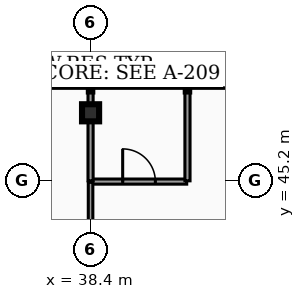
"""IFC4 building model, lengths in metres.
Left out: names, types, materials, properties, quantities, classifications, styles, units other than length and angle.
Written with IfcOpenShell. Run it as: python <this file> out.ifc"""

import sys

from ifc_helpers import new_model, si_unit, direction, frame, frame_2d, origin, origin_2d, place, context, subcontext, project, spatial, rectangle, hollow_rectangle, extrude, element, fill, save


model = new_model("IFC4")
c1 = context("Model", 3, precision=1e-05, world=origin(), true_north=direction((0.0, 1.0)))
c2 = subcontext(c1, "Body", "Model", "MODEL_VIEW")
j1 = project(units=[si_unit("LENGTHUNIT", "METRE"), si_unit("PLANEANGLEUNIT", "RADIAN")], contexts=[c1])
p1 = place(None, origin())
s1 = spatial("IfcSite", under=j1, at=p1, CompositionType="ELEMENT")
p2 = place(p1, origin())
s2 = spatial("IfcBuilding", under=s1, at=p2, CompositionType="ELEMENT")
p3 = place(p2, frame((0.0, 0.0, 282.2)))
s3 = spatial("IfcBuildingStorey", under=s2, at=p3, CompositionType="ELEMENT", Elevation=282.2)
p4 = place(p3, frame((38.4, 46.983, 0.0), z_axis=(0.0, 0.0, 1.0), x_axis=(1.0, 0.0, 0.0)))
e1 = element("IfcColumn", 1, at=p4, inside=s3, PredefinedType="COLUMN", context=c2, shape_type="SweptSolid", body=[
    extrude(hollow_rectangle(XDim=0.45, YDim=0.45, WallThickness=0.022, at=origin_2d()), origin(), (0.0, 0.0, 1.0), 3.18),
])
p5 = place(p3, frame((38.42, 45.173, 0.0), z_axis=(0.0, 0.0, 1.0), x_axis=(1.0, 0.0, 0.0)))
e2 = element("IfcWall", 2, at=p5, inside=s3, PredefinedType="PARTITIONING", context=c2, shape_type="SweptSolid", body=[
    extrude(rectangle(XDim=2.51, YDim=0.135, at=frame_2d((1.255, 0.0))), origin(), (0.0, 0.0, 1.0), 2.235),
])
p6 = place(p5, frame((0.825, 0.0, 0.0)))
e3 = element("IfcOpeningElement", 3, at=p6, cuts=e2, PredefinedType="OPENING", context=c2, shape_type="SweptSolid", body=[
    extrude(rectangle(XDim=0.86, YDim=2.05, at=frame_2d((0.43, 1.025))), frame((0.0, 0.077, 0.0), z_axis=(0.0, -1.0, 0.0), x_axis=(1.0, 0.0, 0.0)), (0.0, 0.0, 1.0), 0.155),
])
p7 = place(p3, frame((40.95, 45.193, 0.0), z_axis=(0.0, 0.0, 1.0), x_axis=(0.0, 1.0, 0.0)))
e4 = element("IfcWall", 4, at=p7, inside=s3, PredefinedType="PARTITIONING", context=c2, shape_type="SweptSolid", body=[
    extrude(rectangle(XDim=2.425, YDim=0.135, at=frame_2d((1.212, 0.0))), origin(), (0.0, 0.0, 1.0), 2.235),
])
p8 = place(p3, frame((38.4, 43.415, 0.0), z_axis=(0.0, 0.0, 1.0), x_axis=(0.0, 1.0, 0.0)))
e5 = element("IfcWall", 5, at=p8, inside=s3, PredefinedType="PARTITIONING", context=c2, shape_type="SweptSolid", body=[
    extrude(rectangle(XDim=1.738, YDim=0.12, at=frame_2d((0.869, 0.0))), origin(), (0.0, 0.0, 1.0), 2.235),
])
p9 = place(p3, frame((38.4, 45.193, 0.0), z_axis=(0.0, 0.0, 1.0), x_axis=(0.0, 1.0, 0.0)))
e6 = element("IfcWall", 6, at=p9, inside=s3, PredefinedType="PARTITIONING", context=c2, shape_type="SweptSolid", body=[
    extrude(rectangle(XDim=2.425, YDim=0.135, at=frame_2d((1.212, 0.0))), origin(), (0.0, 0.0, 1.0), 2.235),
])
p10 = place(p6, origin())
e7 = element("IfcDoor", 7, at=p10, inside=s3, OperationType="SINGLE_SWING_LEFT", PredefinedType="DOOR", context=c2, shape_type="SweptSolid", body=[
    extrude(rectangle(XDim=0.86, YDim=2.05, at=frame_2d((0.43, 1.025))), frame((0.0, 0.025, 0.0), z_axis=(0.0, -1.0, 0.0), x_axis=(1.0, 0.0, 0.0)), (0.0, 0.0, 1.0), 0.05),
])
fill(e3, e7)
save(model, sys.argv[1])
